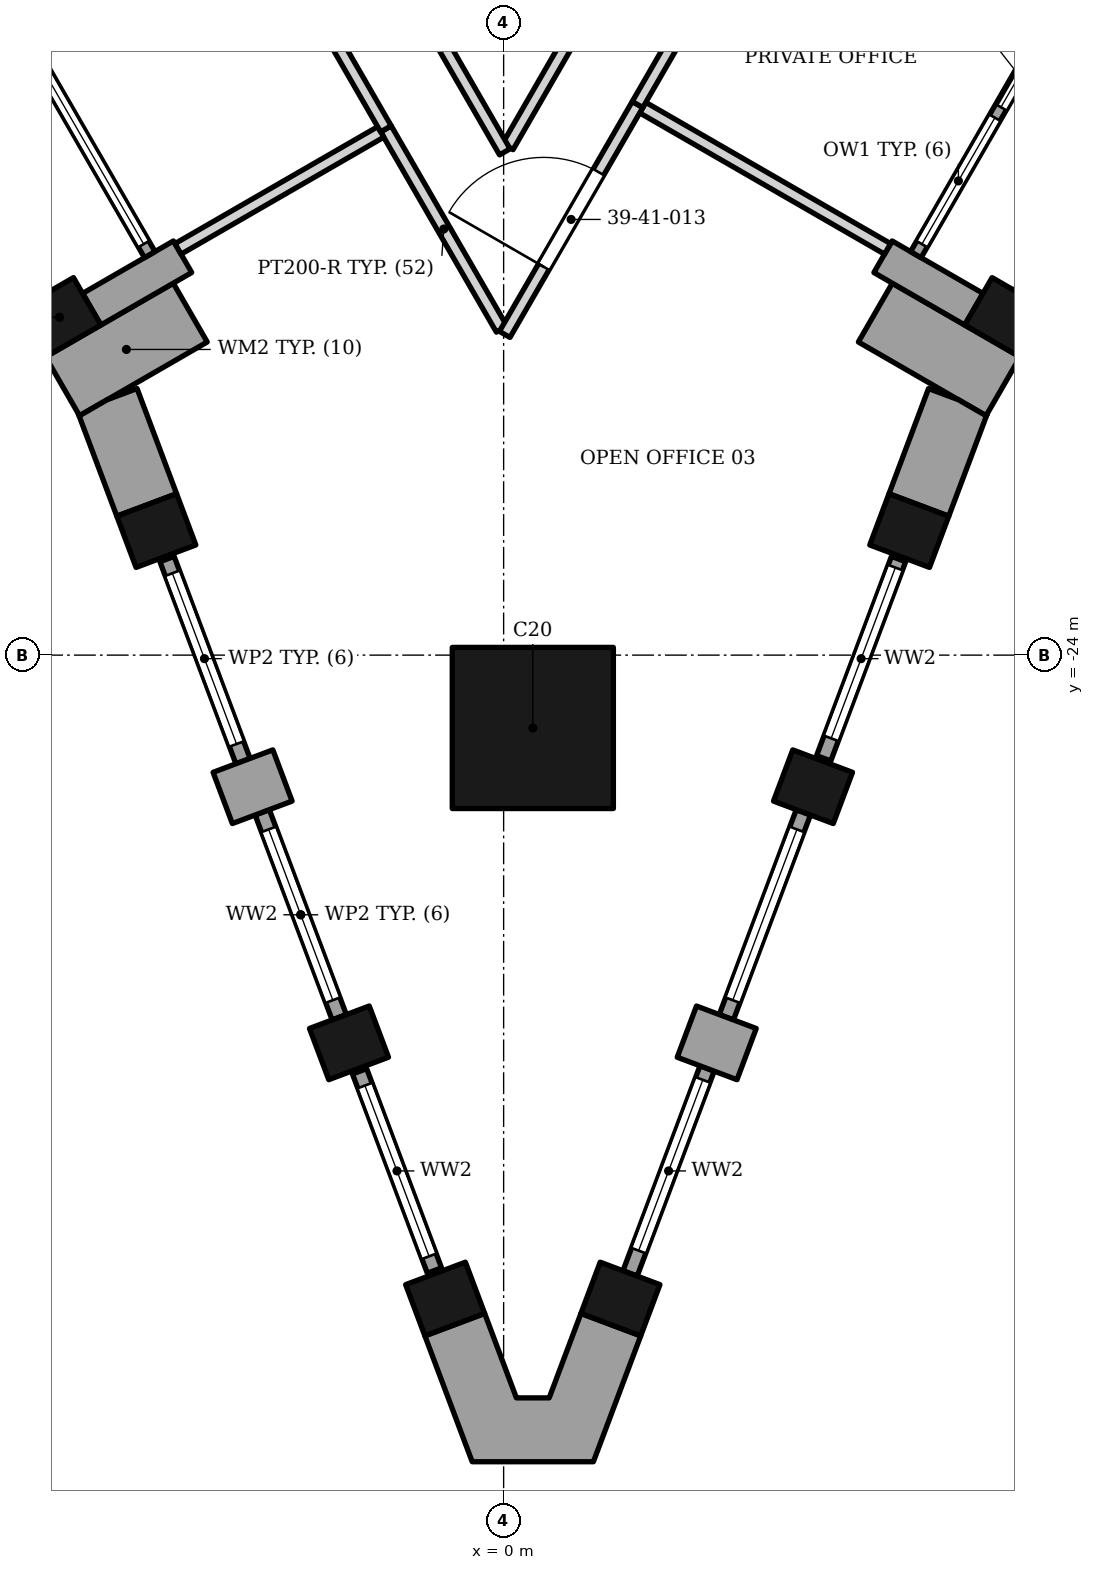
"""IFC4 building model, lengths in metres.
Left out: names, types, materials, properties, quantities, classifications, styles, units other than length and angle.
Written with IfcOpenShell. Run it as: python <this file> out.ifc"""

import sys

from ifc_helpers import new_model, si_unit, direction, frame, frame_2d, origin, origin_2d, place, context, subcontext, project, spatial, polyline, rectangle, outline, extrude, element, fill, save


model = new_model("IFC4")
c1 = context("Model", 3, precision=1e-05, world=origin(), true_north=direction((0.0, 1.0)))
c2 = subcontext(c1, "Body", "Model", "MODEL_VIEW")
j1 = project(units=[si_unit("LENGTHUNIT", "METRE"), si_unit("PLANEANGLEUNIT", "RADIAN")], contexts=[c1])
p1 = place(None, origin())
s1 = spatial("IfcSite", under=j1, at=p1, CompositionType="ELEMENT")
p2 = place(p1, origin())
s2 = spatial("IfcBuilding", under=s1, at=p2, CompositionType="ELEMENT")
p3 = place(p2, frame((0.0, 0.0, 168.0)))
s3 = spatial("IfcBuildingStorey", under=s2, at=p3, CompositionType="ELEMENT", Elevation=168.0)
p4 = place(p3, frame((0.48, -25.198, 0.0), z_axis=(0.0, 0.0, 1.0), x_axis=(0.0, 1.0, 0.0)))
e1 = element("IfcColumn", 1, at=p4, inside=s3, PredefinedType="COLUMN", context=c2, shape_type="SweptSolid", body=[
    extrude(rectangle(XDim=2.65, YDim=2.65, at=origin_2d()), origin(), (0.0, 0.0, 1.0), 3.9),
])
for number, where, z_axis, x_axis in (
    (2, (-7.304, -18.444, 0.0), (0.0, 0.0, 1.0), (0.5, -0.866, 0.0)),
    (3, (-5.712, -21.952, 0.0), (0.0, 0.0, 1.0), (0.352, -0.936, 0.0)),
    (4, (-2.543, -30.376, 0.0), (0.0, 0.0, 1.0), (0.352, -0.936, 0.0)),
    (5, (-0.962, -34.589, 0.0), (0.0, 0.0, 1.0), (0.352, -0.936, 0.0)),
    (6, (1.921, -34.589, 0.0), (0.0, 0.0, 1.0), (0.352, 0.936, 0.0)),
    (7, (5.088, -26.164, 0.0), (0.0, 0.0, 1.0), (0.352, 0.936, 0.0)),
    (8, (6.671, -21.952, 0.0), (0.0, 0.0, 1.0), (0.352, 0.936, 0.0)),
    (9, (8.263, -18.444, 0.0), (0.0, 0.0, 1.0), (0.5, 0.866, 0.0)),
):
    element("IfcColumn", number, at=place(p3, frame(where, z_axis=z_axis, x_axis=x_axis)), inside=s3, PredefinedType="COLUMN", context=c2, shape_type="SweptSolid", body=[
        extrude(rectangle(XDim=0.9, YDim=1.05, at=origin_2d()), origin(), (0.0, 0.0, 1.0), 3.9),
    ])
p5 = place(p3, frame((-6.774, -18.311, 0.0), z_axis=(0.0, 0.0, 1.0), x_axis=(0.866013532718, 0.500020560727, 0.0)))
e10 = element("IfcWall", 10, at=p5, inside=s3, PredefinedType="SOLIDWALL", context=c2, shape_type="SweptSolid", body=[
    extrude(rectangle(XDim=1.725, YDim=0.6, at=frame_2d((0.863, 0.0))), origin(), (0.0, 0.0, 1.0), 3.0),
])
p6 = place(p3, frame((-7.92, -13.777, 0.0), z_axis=(0.0, 0.0, 1.0), x_axis=(0.500027713859, -0.866009402589, 0.0)))
e11 = element("IfcWall", 11, at=p6, inside=s3, PredefinedType="ELEMENTEDWALL", context=c2, shape_type="SweptSolid", body=[
    extrude(rectangle(XDim=4.2, YDim=0.2, at=frame_2d((2.1, 0.0))), origin(), (0.0, 0.0, 1.0), 3.0),
])
p7 = place(p6, frame((0.2, 0.0, 0.45)))
e12 = element("IfcOpeningElement", 12, at=p7, cuts=e11, PredefinedType="OPENING", context=c2, shape_type="SweptSolid", body=[
    extrude(rectangle(XDim=3.8, YDim=2.25, at=frame_2d((1.9, 1.125))), frame((0.0, 0.11, 0.0), z_axis=(0.0, -1.0, 0.0), x_axis=(1.0, 0.0, 0.0)), (0.0, 0.0, 1.0), 0.22),
])
p8 = place(p3, frame((7.733, -18.311, 0.0), z_axis=(0.0, 0.0, 1.0), x_axis=(-0.866013532718, 0.500020560727, 0.0)))
e13 = element("IfcWall", 13, at=p8, inside=s3, PredefinedType="SOLIDWALL", context=c2, shape_type="SweptSolid", body=[
    extrude(rectangle(XDim=1.725, YDim=0.6, at=frame_2d((0.863, 0.0))), origin(), (0.0, 0.0, 1.0), 3.0),
])
p9 = place(p3, frame((6.779, -17.414, 0.0), z_axis=(0.0, 0.0, 1.0), x_axis=(0.500027713859, 0.866009402589, 0.0)))
e14 = element("IfcWall", 14, at=p9, inside=s3, PredefinedType="ELEMENTEDWALL", context=c2, shape_type="SweptSolid", body=[
    extrude(rectangle(XDim=4.2, YDim=0.2, at=frame_2d((2.1, 0.0))), origin(), (0.0, 0.0, 1.0), 3.0),
])
p10 = place(p9, frame((0.2, 0.0, 0.45)))
e15 = element("IfcOpeningElement", 15, at=p10, cuts=e14, PredefinedType="OPENING", context=c2, shape_type="SweptSolid", body=[
    extrude(rectangle(XDim=2.4, YDim=2.25, at=frame_2d((1.2, 1.125))), frame((0.0, 0.11, 0.0), z_axis=(0.0, -1.0, 0.0), x_axis=(1.0, 0.0, 0.0)), (0.0, 0.0, 1.0), 0.22),
])
p11 = place(p9, frame((2.8, 0.0, 0.0)))
e16 = element("IfcOpeningElement", 16, at=p11, cuts=e14, PredefinedType="OPENING", context=c2, shape_type="SweptSolid", body=[
    extrude(rectangle(XDim=1.2, YDim=2.7, at=frame_2d((0.6, 1.35))), frame((0.0, 0.11, 0.0), z_axis=(0.0, -1.0, 0.0), x_axis=(1.0, 0.0, 0.0)), (0.0, 0.0, 1.0), 0.22),
])
for number, where, z_axis, x_axis in (
    (17, (-5.154, -18.367, 0.0), (0.0, 0.0, 1.0), (-0.866, -0.5, 0.0)),
    (18, (8.213, -19.58, 0.0), (0.0, 0.0, 1.0), (-0.866, 0.5, 0.0)),
):
    element("IfcWall", number, at=place(p3, frame(where, z_axis=z_axis, x_axis=x_axis)), inside=s3, PredefinedType="SOLIDWALL", context=c2, shape_type="SweptSolid", body=[
        extrude(rectangle(XDim=2.425, YDim=1.117, at=frame_2d((1.212, 0.0))), origin(), (0.0, 0.0, 1.0), 3.0),
    ])
p12 = place(p3, frame((-4.62, -26.349, 0.0), z_axis=(0.0, 0.0, 1.0), x_axis=(0.936003928089, 0.351989554676, 0.0)))
e19 = element("IfcWall", 19, at=p12, inside=s3, PredefinedType="SOLIDWALL", context=c2, shape_type="SweptSolid", body=[
    extrude(rectangle(XDim=1.05, YDim=0.9, at=frame_2d((0.525, 0.0))), origin(), (0.0, 0.0, 1.0), 2.95),
])
p13 = place(p3, frame((-5.536, -22.42, 0.0), z_axis=(0.0, 0.0, 1.0), x_axis=(0.351861542378, -0.936052057845, 0.0)))
e20 = element("IfcWall", 20, at=p13, inside=s3, PredefinedType="ELEMENTEDWALL", context=c2, shape_type="SweptSolid", body=[
    extrude(rectangle(XDim=3.552, YDim=0.25, at=frame_2d((1.776, 0.0))), origin(), (0.0, 0.0, 1.0), 3.0),
])
p14 = place(p13, frame((0.25, 0.0, 0.3)))
e21 = element("IfcOpeningElement", 21, at=p14, cuts=e20, PredefinedType="OPENING", context=c2, shape_type="SweptSolid", body=[
    extrude(rectangle(XDim=3.0, YDim=2.5, at=frame_2d((1.5, 1.25))), frame((0.0, 0.135, 0.0), z_axis=(0.0, -1.0, 0.0), x_axis=(1.0, 0.0, 0.0)), (0.0, 0.0, 1.0), 0.27),
])
p15 = place(p3, frame((-3.97, -26.585, 0.0), z_axis=(0.0, 0.0, 1.0), x_axis=(0.351829371284, -0.936064150314, 0.0)))
e22 = element("IfcWall", 22, at=p15, inside=s3, PredefinedType="ELEMENTEDWALL", context=c2, shape_type="SweptSolid", body=[
    extrude(rectangle(XDim=3.6, YDim=0.25, at=frame_2d((1.8, 0.0))), origin(), (0.0, 0.0, 1.0), 3.0),
])
p16 = place(p15, frame((0.3, 0.0, 0.3)))
e23 = element("IfcOpeningElement", 23, at=p16, cuts=e22, PredefinedType="OPENING", context=c2, shape_type="SweptSolid", body=[
    extrude(rectangle(XDim=3.0, YDim=2.5, at=frame_2d((1.5, 1.25))), frame((0.0, 0.135, 0.0), z_axis=(0.0, -1.0, 0.0), x_axis=(1.0, 0.0, 0.0)), (0.0, 0.0, 1.0), 0.27),
])
p17 = place(p3, frame((-2.369, -30.844, 0.0), z_axis=(0.0, 0.0, 1.0), x_axis=(0.351788440802, -0.936079533436, 0.0)))
e24 = element("IfcWall", 24, at=p17, inside=s3, PredefinedType="ELEMENTEDWALL", context=c2, shape_type="SweptSolid", body=[
    extrude(rectangle(XDim=3.5, YDim=0.25, at=frame_2d((1.75, 0.0))), origin(), (0.0, 0.0, 1.0), 3.0),
])
p18 = place(p17, frame((0.25, 0.0, 0.3)))
e25 = element("IfcOpeningElement", 25, at=p18, cuts=e24, PredefinedType="OPENING", context=c2, shape_type="SweptSolid", body=[
    extrude(rectangle(XDim=3.0, YDim=2.5, at=frame_2d((1.5, 1.25))), frame((0.0, 0.135, 0.0), z_axis=(0.0, -1.0, 0.0), x_axis=(1.0, 0.0, 0.0)), (0.0, 0.0, 1.0), 0.27),
])
p19 = place(p3, frame((3.996, -30.561, 0.0), z_axis=(0.0, 0.0, 1.0), x_axis=(-0.936080509118, 0.351785844584, 0.0)))
e26 = element("IfcWall", 26, at=p19, inside=s3, PredefinedType="SOLIDWALL", context=c2, shape_type="SweptSolid", body=[
    extrude(rectangle(XDim=1.05, YDim=0.9, at=frame_2d((0.525, 0.0))), origin(), (0.0, 0.0, 1.0), 3.0),
])
p20 = place(p3, frame((2.08, -34.167, 0.0), z_axis=(0.0, 0.0, 1.0), x_axis=(0.351829371284, 0.936064150314, 0.0)))
e27 = element("IfcWall", 27, at=p20, inside=s3, PredefinedType="ELEMENTEDWALL", context=c2, shape_type="SweptSolid", body=[
    extrude(rectangle(XDim=3.6, YDim=0.25, at=frame_2d((1.8, 0.0))), origin(), (0.0, 0.0, 1.0), 3.0),
])
p21 = place(p20, frame((0.4, 0.0, 0.3)))
e28 = element("IfcOpeningElement", 28, at=p21, cuts=e27, PredefinedType="OPENING", context=c2, shape_type="SweptSolid", body=[
    extrude(rectangle(XDim=3.0, YDim=2.5, at=frame_2d((1.5, 1.25))), frame((0.0, 0.135, 0.0), z_axis=(0.0, -1.0, 0.0), x_axis=(1.0, 0.0, 0.0)), (0.0, 0.0, 1.0), 0.27),
])
p22 = place(p3, frame((3.663, -29.955, 0.0), z_axis=(0.0, 0.0, 1.0), x_axis=(0.351829371284, 0.936064150314, 0.0)))
e29 = element("IfcWall", 29, at=p22, inside=s3, PredefinedType="ELEMENTEDWALL", context=c2, shape_type="SweptSolid", body=[
    extrude(rectangle(XDim=3.6, YDim=0.25, at=frame_2d((1.8, 0.0))), origin(), (0.0, 0.0, 1.0), 3.0),
])
p23 = place(p22, frame((0.3, 0.0, 0.3)))
e30 = element("IfcOpeningElement", 30, at=p23, cuts=e29, PredefinedType="OPENING", context=c2, shape_type="SweptSolid", body=[
    extrude(rectangle(XDim=3.0, YDim=2.5, at=frame_2d((1.5, 1.25))), frame((0.0, 0.135, 0.0), z_axis=(0.0, -1.0, 0.0), x_axis=(1.0, 0.0, 0.0)), (0.0, 0.0, 1.0), 0.27),
])
p24 = place(p3, frame((5.264, -25.696, 0.0), z_axis=(0.0, 0.0, 1.0), x_axis=(0.351788440802, 0.936079533436, 0.0)))
e31 = element("IfcWall", 31, at=p24, inside=s3, PredefinedType="ELEMENTEDWALL", context=c2, shape_type="SweptSolid", body=[
    extrude(rectangle(XDim=3.5, YDim=0.25, at=frame_2d((1.75, 0.0))), origin(), (0.0, 0.0, 1.0), 3.0),
])
p25 = place(p24, frame((0.35, 0.0, 0.3)))
e32 = element("IfcOpeningElement", 32, at=p25, cuts=e31, PredefinedType="OPENING", context=c2, shape_type="SweptSolid", body=[
    extrude(rectangle(XDim=3.0, YDim=2.5, at=frame_2d((1.5, 1.25))), frame((0.0, 0.135, 0.0), z_axis=(0.0, -1.0, 0.0), x_axis=(1.0, 0.0, 0.0)), (0.0, 0.0, 1.0), 0.27),
])
p26 = place(p3, origin())
e33 = element("IfcWall", 33, at=p26, inside=s3, PredefinedType="SOLIDWALL", context=c2, shape_type="SweptSolid", body=[
    extrude(outline(polyline([(-5.379, -21.346), (-6.029, -19.616), (-6.52, -19.801), (-6.975, -20.063), (-6.997, -20.026), (-6.362, -21.715), (-5.379, -21.346)])), origin(), (0.0, 0.0, 1.0), 3.0),
])
p27 = place(p3, origin())
e34 = element("IfcWall", 34, at=p27, inside=s3, PredefinedType="SOLIDWALL", context=c2, shape_type="SweptSolid", body=[
    extrude(outline(polyline([(-1.295, -35.195), (-0.517, -37.265), (1.477, -37.265), (2.255, -35.195), (1.271, -34.826), (0.75, -36.215), (0.21, -36.215), (-0.312, -34.825), (-1.295, -35.195)])), origin(), (0.0, 0.0, 1.0), 3.0),
])
p28 = place(p3, origin())
e35 = element("IfcWall", 35, at=p28, inside=s3, PredefinedType="SOLIDWALL", context=c2, shape_type="SweptSolid", body=[
    extrude(outline(polyline([(6.988, -19.616), (6.338, -21.346), (7.321, -21.715), (7.956, -20.026), (7.934, -20.063), (7.48, -19.801), (6.988, -19.616)])), origin(), (0.0, 0.0, 1.0), 3.0),
])
p29 = place(p3, frame((-1.936, -15.345, 0.0), z_axis=(0.0, 0.0, 1.0), x_axis=(0.500383446004, -0.865803907918, 0.0)))
e36 = element("IfcWall", 36, at=p29, inside=s3, PredefinedType="PARTITIONING", context=c2, shape_type="SweptSolid", body=[
    extrude(rectangle(XDim=3.804, YDim=0.2, at=frame_2d((1.902, 0.0))), origin(), (0.0, 0.0, 1.0), 3.128),
])
p30 = place(p3, frame((2.287, -14.996, 0.0), z_axis=(0.0, 0.0, 1.0), x_axis=(0.866183837695, -0.499725483956, 0.0)))
e37 = element("IfcWall", 37, at=p30, inside=s3, PredefinedType="PARTITIONING", context=c2, shape_type="SweptSolid", body=[
    extrude(rectangle(XDim=4.649, YDim=0.2, at=frame_2d((2.325, 0.0))), origin(), (0.0, 0.0, 1.0), 3.052),
])
p31 = place(p3, frame((0.068, -15.638, 0.0), z_axis=(0.0, 0.0, 1.0), x_axis=(0.499989755964, 0.866031318101, 0.0)))
e38 = element("IfcWall", 38, at=p31, inside=s3, PredefinedType="PARTITIONING", context=c2, shape_type="SweptSolid", body=[
    extrude(rectangle(XDim=10.331, YDim=0.2, at=frame_2d((5.166, 0.0))), origin(), (0.0, 0.0, 1.0), 2.884),
])
p32 = place(p31, frame((3.385, 0.0, 0.0)))
e39 = element("IfcOpeningElement", 39, at=p32, cuts=e38, PredefinedType="OPENING", context=c2, shape_type="SweptSolid", body=[
    extrude(rectangle(XDim=0.9, YDim=2.1, at=frame_2d((0.45, 1.05))), frame((0.0, 0.11, 0.0), z_axis=(0.0, -1.0, 0.0), x_axis=(1.0, 0.0, 0.0)), (0.0, 0.0, 1.0), 0.22),
])
p33 = place(p3, frame((-5.355, -17.319, 0.0), z_axis=(0.0, 0.0, 1.0), x_axis=(0.866214094833, 0.499673035007, 0.0)))
e40 = element("IfcWall", 40, at=p33, inside=s3, PredefinedType="PARTITIONING", context=c2, shape_type="SweptSolid", body=[
    extrude(rectangle(XDim=3.849, YDim=0.2, at=frame_2d((1.925, 0.0))), origin(), (0.0, 0.0, 1.0), 3.128),
])
p34 = place(p3, frame((-10.936, 0.244, 0.0), z_axis=(0.0, 0.0, 1.0), x_axis=(0.5000018851, -0.866024315419, 0.0)))
e41 = element("IfcWall", 41, at=p34, inside=s3, PredefinedType="PARTITIONING", context=c2, shape_type="SweptSolid", body=[
    extrude(rectangle(XDim=18.0, YDim=0.2, at=frame_2d((9.0, 0.0))), origin(), (0.0, 0.0, 1.0), 2.884),
])
p35 = place(p34, frame((3.6, 0.0, 0.0)))
e42 = element("IfcOpeningElement", 42, at=p35, cuts=e41, PredefinedType="OPENING", context=c2, shape_type="SweptSolid", body=[
    extrude(rectangle(XDim=1.8, YDim=2.4, at=frame_2d((0.9, 1.2))), frame((0.0, 0.11, 0.0), z_axis=(0.0, -1.0, 0.0), x_axis=(1.0, 0.0, 0.0)), (0.0, 0.0, 1.0), 0.22),
])
p36 = place(p34, frame((13.0, 0.0, 0.0)))
e43 = element("IfcOpeningElement", 43, at=p36, cuts=e41, PredefinedType="OPENING", context=c2, shape_type="SweptSolid", body=[
    extrude(rectangle(XDim=1.0, YDim=2.4, at=frame_2d((0.5, 1.2))), frame((0.0, 0.11, 0.0), z_axis=(0.0, -1.0, 0.0), x_axis=(1.0, 0.0, 0.0)), (0.0, 0.0, 1.0), 0.22),
])
p37 = place(p3, frame((0.018, -18.725, 0.0), z_axis=(0.0, 0.0, 1.0), x_axis=(0.500372623754, 0.865810162448, 0.0)))
e44 = element("IfcWall", 44, at=p37, inside=s3, PredefinedType="PARTITIONING", context=c2, shape_type="SweptSolid", body=[
    extrude(rectangle(XDim=4.366, YDim=0.2, at=frame_2d((2.183, 0.0))), origin(), (0.0, 0.0, 1.0), 3.128),
])
p38 = place(p37, frame((1.283, 0.0, 0.0)))
e45 = element("IfcOpeningElement", 45, at=p38, cuts=e44, PredefinedType="OPENING", context=c2, shape_type="SweptSolid", body=[
    extrude(rectangle(XDim=1.8, YDim=2.4, at=frame_2d((0.9, 1.2))), frame((0.0, 0.11, 0.0), z_axis=(0.0, -1.0, 0.0), x_axis=(1.0, 0.0, 0.0)), (0.0, 0.0, 1.0), 0.22),
])
p39 = place(p3, frame((-5.196, -6.69, 0.0), z_axis=(0.0, 0.0, 1.0), x_axis=(0.499990567915, -0.866030849332, 0.0)))
e46 = element("IfcWall", 46, at=p39, inside=s3, PredefinedType="PARTITIONING", context=c2, shape_type="SweptSolid", body=[
    extrude(rectangle(XDim=10.431, YDim=0.2, at=frame_2d((5.215, 0.0))), origin(), (0.0, 0.0, 1.0), 2.884),
])
p40 = place(p39, frame((3.148, 0.0, 0.0)))
e47 = element("IfcOpeningElement", 47, at=p40, cuts=e46, PredefinedType="OPENING", context=c2, shape_type="SweptSolid", body=[
    extrude(rectangle(XDim=0.9, YDim=2.1, at=frame_2d((0.45, 1.05))), frame((0.0, 0.11, 0.0), z_axis=(0.0, -1.0, 0.0), x_axis=(1.0, 0.0, 0.0)), (0.0, 0.0, 1.0), 0.22),
])
p41 = place(p3, frame((2.202, -14.945, 0.0), z_axis=(0.0, 0.0, 1.0), x_axis=(0.499997969693, 0.866026575979, 0.0)))
e48 = element("IfcWall", 48, at=p41, inside=s3, PredefinedType="PARTITIONING", context=c2, shape_type="SweptSolid", body=[
    extrude(rectangle(XDim=13.5, YDim=0.2, at=frame_2d((6.75, 0.0))), origin(), (0.0, 0.0, 1.0), 2.884),
])
p42 = place(p41, frame((1.8, 0.0, 0.0)))
e49 = element("IfcOpeningElement", 49, at=p42, cuts=e48, PredefinedType="OPENING", context=c2, shape_type="SweptSolid", body=[
    extrude(rectangle(XDim=0.9, YDim=2.1, at=frame_2d((0.45, 1.05))), frame((0.0, 0.11, 0.0), z_axis=(0.0, -1.0, 0.0), x_axis=(1.0, 0.0, 0.0)), (0.0, 0.0, 1.0), 0.22),
])
p43 = place(p41, frame((8.1, 0.0, 0.0)))
e50 = element("IfcOpeningElement", 50, at=p43, cuts=e48, PredefinedType="OPENING", context=c2, shape_type="SweptSolid", body=[
    extrude(rectangle(XDim=1.8, YDim=2.4, at=frame_2d((0.9, 1.2))), frame((0.0, 0.11, 0.0), z_axis=(0.0, -1.0, 0.0), x_axis=(1.0, 0.0, 0.0)), (0.0, 0.0, 1.0), 0.22),
])
p44 = place(p7, origin())
e51 = element("IfcWindow", 51, at=p44, inside=s3, PartitioningType="SINGLE_PANEL", PredefinedType="WINDOW", context=c2, shape_type="SweptSolid", body=[
    extrude(rectangle(XDim=3.8, YDim=2.25, at=frame_2d((1.9, 1.125))), frame((0.0, 0.03, 0.0), z_axis=(0.0, -1.0, 0.0), x_axis=(1.0, 0.0, 0.0)), (0.0, 0.0, 1.0), 0.06),
])
fill(e12, e51)
p45 = place(p10, origin())
e52 = element("IfcWindow", 52, at=p45, inside=s3, PartitioningType="SINGLE_PANEL", PredefinedType="WINDOW", context=c2, shape_type="SweptSolid", body=[
    extrude(rectangle(XDim=2.4, YDim=2.25, at=frame_2d((1.2, 1.125))), frame((0.0, 0.03, 0.0), z_axis=(0.0, -1.0, 0.0), x_axis=(1.0, 0.0, 0.0)), (0.0, 0.0, 1.0), 0.06),
])
fill(e15, e52)
p46 = place(p11, origin())
e53 = element("IfcDoor", 53, at=p46, inside=s3, OperationType="SINGLE_SWING_LEFT", PredefinedType="DOOR", context=c2, shape_type="SweptSolid", body=[
    extrude(rectangle(XDim=1.2, YDim=2.7, at=frame_2d((0.6, 1.35))), frame((0.0, 0.025, 0.0), z_axis=(0.0, -1.0, 0.0), x_axis=(1.0, 0.0, 0.0)), (0.0, 0.0, 1.0), 0.05),
])
fill(e16, e53)
p47 = place(p14, origin())
e54 = element("IfcWindow", 54, at=p47, inside=s3, PartitioningType="SINGLE_PANEL", PredefinedType="WINDOW", context=c2, shape_type="SweptSolid", body=[
    extrude(rectangle(XDim=3.0, YDim=2.5, at=frame_2d((1.5, 1.25))), frame((0.0, 0.03, 0.0), z_axis=(0.0, -1.0, 0.0), x_axis=(1.0, 0.0, 0.0)), (0.0, 0.0, 1.0), 0.06),
])
fill(e21, e54)
p48 = place(p16, origin())
e55 = element("IfcWindow", 55, at=p48, inside=s3, PartitioningType="SINGLE_PANEL", PredefinedType="WINDOW", context=c2, shape_type="SweptSolid", body=[
    extrude(rectangle(XDim=3.0, YDim=2.5, at=frame_2d((1.5, 1.25))), frame((0.0, 0.03, 0.0), z_axis=(0.0, -1.0, 0.0), x_axis=(1.0, 0.0, 0.0)), (0.0, 0.0, 1.0), 0.06),
])
fill(e23, e55)
p49 = place(p18, origin())
e56 = element("IfcWindow", 56, at=p49, inside=s3, PartitioningType="SINGLE_PANEL", PredefinedType="WINDOW", context=c2, shape_type="SweptSolid", body=[
    extrude(rectangle(XDim=3.0, YDim=2.5, at=frame_2d((1.5, 1.25))), frame((0.0, 0.03, 0.0), z_axis=(0.0, -1.0, 0.0), x_axis=(1.0, 0.0, 0.0)), (0.0, 0.0, 1.0), 0.06),
])
fill(e25, e56)
p50 = place(p21, origin())
e57 = element("IfcWindow", 57, at=p50, inside=s3, PartitioningType="SINGLE_PANEL", PredefinedType="WINDOW", context=c2, shape_type="SweptSolid", body=[
    extrude(rectangle(XDim=3.0, YDim=2.5, at=frame_2d((1.5, 1.25))), frame((0.0, 0.03, 0.0), z_axis=(0.0, -1.0, 0.0), x_axis=(1.0, 0.0, 0.0)), (0.0, 0.0, 1.0), 0.06),
])
fill(e28, e57)
p51 = place(p23, origin())
e58 = element("IfcWindow", 58, at=p51, inside=s3, PartitioningType="SINGLE_PANEL", PredefinedType="WINDOW", context=c2, shape_type="SweptSolid", body=[
    extrude(rectangle(XDim=3.0, YDim=2.5, at=frame_2d((1.5, 1.25))), frame((0.0, 0.03, 0.0), z_axis=(0.0, -1.0, 0.0), x_axis=(1.0, 0.0, 0.0)), (0.0, 0.0, 1.0), 0.06),
])
fill(e30, e58)
p52 = place(p25, origin())
e59 = element("IfcWindow", 59, at=p52, inside=s3, PartitioningType="SINGLE_PANEL", PredefinedType="WINDOW", context=c2, shape_type="SweptSolid", body=[
    extrude(rectangle(XDim=3.0, YDim=2.5, at=frame_2d((1.5, 1.25))), frame((0.0, 0.03, 0.0), z_axis=(0.0, -1.0, 0.0), x_axis=(1.0, 0.0, 0.0)), (0.0, 0.0, 1.0), 0.06),
])
fill(e32, e59)
p53 = place(p38, origin())
e60 = element("IfcDoor", 60, at=p53, inside=s3, OperationType="DOUBLE_DOOR_SINGLE_SWING", PredefinedType="DOOR", context=c2, shape_type="SweptSolid", body=[
    extrude(rectangle(XDim=1.8, YDim=2.4, at=frame_2d((0.9, 1.2))), frame((0.0, 0.025, 0.0), z_axis=(0.0, -1.0, 0.0), x_axis=(1.0, 0.0, 0.0)), (0.0, 0.0, 1.0), 0.05),
])
fill(e45, e60)
save(model, sys.argv[1])
